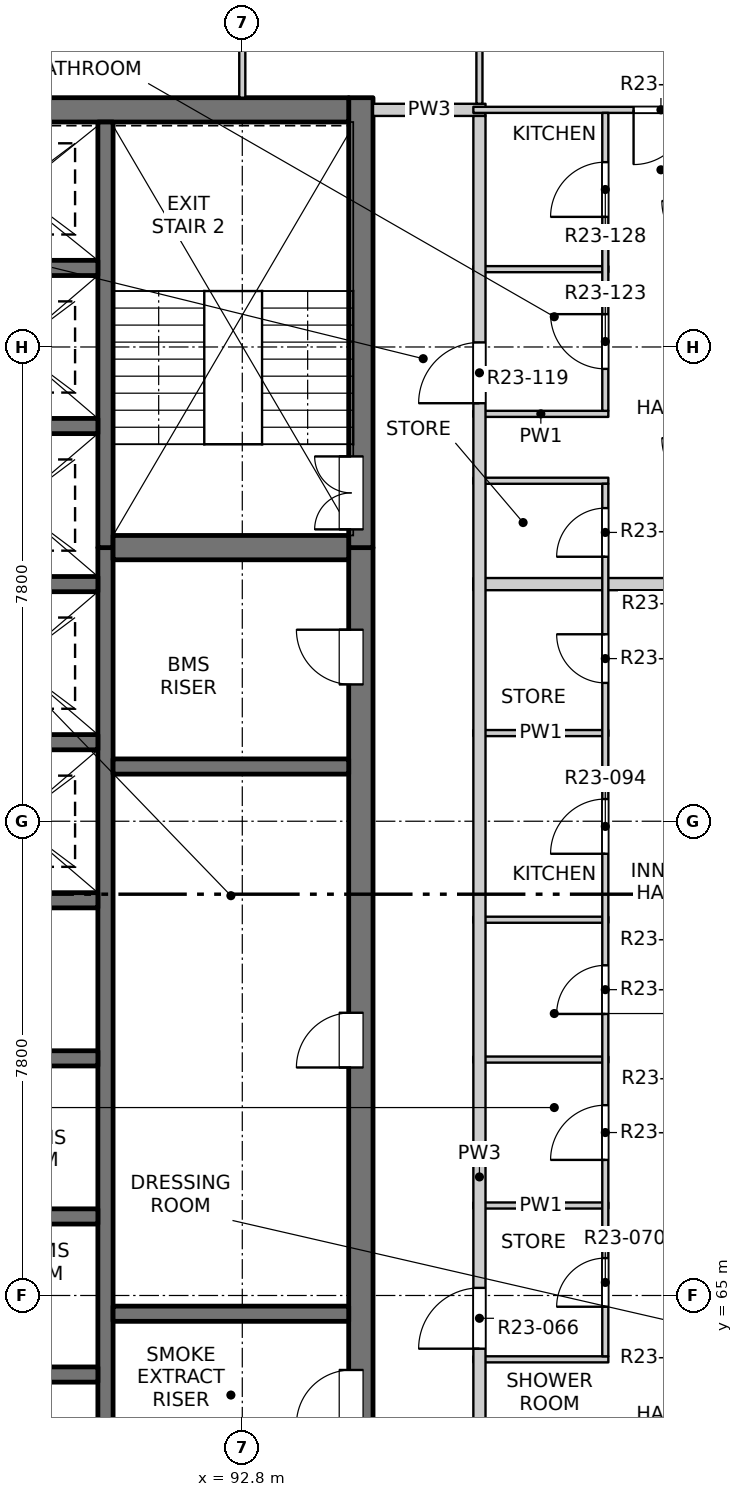
"""IFC4 building model, lengths in metres.
Left out: names, types, materials, properties, quantities, classifications, styles, units other than length and angle.
Written with IfcOpenShell. Run it as: python <this file> out.ifc"""

import sys

from ifc_helpers import new_model, si_unit, direction, frame, frame_2d, origin, place, context, subcontext, project, spatial, rectangle, extrude, element, fill, save


model = new_model("IFC4")
c1 = context("Model", 3, precision=1e-05, world=origin(), true_north=direction((0.0, 1.0)))
c2 = subcontext(c1, "Body", "Model", "MODEL_VIEW")
j1 = project(units=[si_unit("LENGTHUNIT", "METRE"), si_unit("PLANEANGLEUNIT", "RADIAN")], contexts=[c1])
p1 = place(None, origin())
s1 = spatial("IfcSite", under=j1, at=p1, CompositionType="ELEMENT")
p2 = place(p1, origin())
s2 = spatial("IfcBuilding", under=s1, at=p2, CompositionType="ELEMENT")
p3 = place(p2, frame((0.0, 0.0, 238.1)))
s3 = spatial("IfcBuildingStorey", under=s2, at=p3, CompositionType="ELEMENT", Elevation=238.1)
p4 = place(p3, frame((94.75, 61.95, -0.25), z_axis=(0.0, 0.0, 1.0), x_axis=(0.0, 1.0, 0.0)))
e1 = element("IfcWall", 1, at=p4, inside=s3, PredefinedType="SOLIDWALL", context=c2, shape_type="SweptSolid", body=[
    extrude(rectangle(XDim=15.35, YDim=0.4, at=frame_2d((7.675, 0.0))), origin(), (0.0, 0.0, 1.0), 3.35),
])
p5 = place(p4, frame((0.925, 0.0, 0.25)))
e2 = element("IfcOpeningElement", 2, at=p5, cuts=e1, PredefinedType="OPENING", context=c2, shape_type="SweptSolid", body=[
    extrude(rectangle(XDim=0.9, YDim=2.1, at=frame_2d((0.45, 1.05))), frame((0.0, 0.21, 0.0), z_axis=(0.0, -1.0, 0.0), x_axis=(1.0, 0.0, 0.0)), (0.0, 0.0, 1.0), 0.42),
])
p6 = place(p4, frame((6.8, 0.0, 0.25)))
e3 = element("IfcOpeningElement", 3, at=p6, cuts=e1, PredefinedType="OPENING", context=c2, shape_type="SweptSolid", body=[
    extrude(rectangle(XDim=0.9, YDim=2.1, at=frame_2d((0.45, 1.05))), frame((0.0, 0.21, 0.0), z_axis=(0.0, -1.0, 0.0), x_axis=(1.0, 0.0, 0.0)), (0.0, 0.0, 1.0), 0.42),
])
p7 = place(p4, frame((13.1, 0.0, 0.25)))
e4 = element("IfcOpeningElement", 4, at=p7, cuts=e1, PredefinedType="OPENING", context=c2, shape_type="SweptSolid", body=[
    extrude(rectangle(XDim=0.9, YDim=2.1, at=frame_2d((0.45, 1.05))), frame((0.0, 0.21, 0.0), z_axis=(0.0, -1.0, 0.0), x_axis=(1.0, 0.0, 0.0)), (0.0, 0.0, 1.0), 0.42),
])
p8 = place(p3, frame((94.75, 77.3, -0.25), z_axis=(0.0, 0.0, 1.0), x_axis=(0.0, 1.0, 0.0)))
e5 = element("IfcWall", 5, at=p8, inside=s3, PredefinedType="SOLIDWALL", context=c2, shape_type="SweptSolid", body=[
    extrude(rectangle(XDim=7.4, YDim=0.4, at=frame_2d((3.7, 0.0))), origin(), (0.0, 0.0, 1.0), 3.35),
])
p9 = place(p8, frame((0.3, 0.0, 0.25)))
e6 = element("IfcOpeningElement", 6, at=p9, cuts=e5, PredefinedType="OPENING", context=c2, shape_type="SweptSolid", body=[
    extrude(rectangle(XDim=1.2, YDim=2.1, at=frame_2d((0.6, 1.05))), frame((0.0, 0.21, 0.0), z_axis=(0.0, -1.0, 0.0), x_axis=(1.0, 0.0, 0.0)), (0.0, 0.0, 1.0), 0.42),
])
p10 = place(p3, frame((75.45, 84.5, -0.25), z_axis=(0.0, 0.0, 1.0), x_axis=(1.0, 0.0, 0.0)))
e7 = element("IfcWall", 7, at=p10, inside=s3, PredefinedType="SOLIDWALL", context=c2, shape_type="SweptSolid", body=[
    extrude(rectangle(XDim=19.1, YDim=0.4, at=frame_2d((9.55, 0.0))), origin(), (0.0, 0.0, 1.0), 3.35),
])
p11 = place(p3, frame((90.55, 61.95, -0.25), z_axis=(0.0, 0.0, 1.0), x_axis=(0.0, 1.0, 0.0)))
e8 = element("IfcWall", 8, at=p11, inside=s3, PredefinedType="SOLIDWALL", context=c2, shape_type="SweptSolid", body=[
    extrude(rectangle(XDim=15.35, YDim=0.25, at=frame_2d((7.675, 0.0))), origin(), (0.0, 0.0, 1.0), 3.35),
])
p12 = place(p3, frame((90.55, 77.3, -0.25), z_axis=(0.0, 0.0, 1.0), x_axis=(0.0, 1.0, 0.0)))
e9 = element("IfcWall", 9, at=p12, inside=s3, PredefinedType="SOLIDWALL", context=c2, shape_type="SweptSolid", body=[
    extrude(rectangle(XDim=7.0, YDim=0.25, at=frame_2d((3.5, 0.0))), origin(), (0.0, 0.0, 1.0), 3.35),
])
for number, where, z_axis, x_axis in (
    (10, (87.425, 63.7, -0.25), (0.0, 0.0, 1.0), (1.0, 0.0, 0.0)),
    (11, (87.425, 66.3, -0.25), (0.0, 0.0, 1.0), (1.0, 0.0, 0.0)),
    (12, (87.425, 68.9, -0.25), (0.0, 0.0, 1.0), (1.0, 0.0, 0.0)),
    (13, (87.425, 71.5, -0.25), (0.0, 0.0, 1.0), (1.0, 0.0, 0.0)),
    (14, (87.425, 74.1, -0.25), (0.0, 0.0, 1.0), (1.0, 0.0, 0.0)),
    (15, (87.425, 76.7, -0.25), (0.0, 0.0, 1.0), (1.0, 0.0, 0.0)),
    (16, (87.425, 79.3, -0.25), (0.0, 0.0, 1.0), (1.0, 0.0, 0.0)),
    (17, (87.425, 81.9, -0.25), (0.0, 0.0, 1.0), (1.0, 0.0, 0.0)),
):
    element("IfcWall", number, at=place(p3, frame(where, z_axis=z_axis, x_axis=x_axis)), inside=s3, PredefinedType="SOLIDWALL", context=c2, shape_type="SweptSolid", body=[
        extrude(rectangle(XDim=3.0, YDim=0.25, at=frame_2d((1.5, 0.0))), origin(), (0.0, 0.0, 1.0), 3.35),
    ])
for number, where, z_axis, x_axis in (
    (18, (90.675, 64.7, -0.25), (0.0, 0.0, 1.0), (1.0, 0.0, 0.0)),
    (19, (90.675, 73.7, -0.25), (0.0, 0.0, 1.0), (1.0, 0.0, 0.0)),
):
    element("IfcWall", number, at=place(p3, frame(where, z_axis=z_axis, x_axis=x_axis)), inside=s3, PredefinedType="SOLIDWALL", context=c2, shape_type="SweptSolid", body=[
        extrude(rectangle(XDim=3.875, YDim=0.25, at=frame_2d((1.938, 0.0))), origin(), (0.0, 0.0, 1.0), 3.35),
    ])
p13 = place(p3, frame((90.675, 77.3, -0.25), z_axis=(0.0, 0.0, 1.0), x_axis=(1.0, 0.0, 0.0)))
e20 = element("IfcWall", 20, at=p13, inside=s3, PredefinedType="SOLIDWALL", context=c2, shape_type="SweptSolid", body=[
    extrude(rectangle(XDim=3.875, YDim=0.4, at=frame_2d((1.938, 0.0))), origin(), (0.0, 0.0, 1.0), 3.35),
])
for number, where, z_axis, x_axis in (
    (21, (96.6, 63.95, 0.0), (0.0, 0.0, 1.0), (1.0, 0.0, 0.0)),
    (22, (96.6, 66.48, 0.0), (0.0, 0.0, 1.0), (1.0, 0.0, 0.0)),
    (23, (96.6, 68.88, 0.0), (0.0, 0.0, 1.0), (1.0, 0.0, 0.0)),
    (24, (96.6, 71.18, 0.0), (0.0, 0.0, 1.0), (1.0, 0.0, 0.0)),
    (25, (96.6, 74.25, 0.0), (0.0, 0.0, 1.0), (1.0, 0.0, 0.0)),
):
    element("IfcWall", number, at=place(p3, frame(where, z_axis=z_axis, x_axis=x_axis)), inside=s3, PredefinedType="PARTITIONING", context=c2, shape_type="SweptSolid", body=[
        extrude(rectangle(XDim=2.22, YDim=0.1, at=frame_2d((1.11, 0.0))), origin(), (0.0, 0.0, 1.0), 3.1),
    ])
p14 = place(p3, frame((96.6, 76.7, 0.0), z_axis=(0.0, 0.0, 1.0), x_axis=(1.0, 0.0, 0.0)))
e26 = element("IfcWall", 26, at=p14, inside=s3, PredefinedType="PARTITIONING", context=c2, shape_type="SweptSolid", body=[
    extrude(rectangle(XDim=11.5, YDim=0.2, at=frame_2d((5.75, 0.0))), origin(), (0.0, 0.0, 1.0), 3.1),
])
for number, where, z_axis, x_axis in (
    (27, (96.6, 78.4, 0.0), (0.0, 0.0, 1.0), (1.0, 0.0, 0.0)),
    (28, (96.6, 79.5, 0.0), (0.0, 0.0, 1.0), (1.0, 0.0, 0.0)),
    (29, (96.6, 81.88, 0.0), (0.0, 0.0, 1.0), (1.0, 0.0, 0.0)),
):
    element("IfcWall", number, at=place(p3, frame(where, z_axis=z_axis, x_axis=x_axis)), inside=s3, PredefinedType="PARTITIONING", context=c2, shape_type="SweptSolid", body=[
        extrude(rectangle(XDim=2.22, YDim=0.1, at=frame_2d((1.11, 0.0))), origin(), (0.0, 0.0, 1.0), 3.1),
    ])
p15 = place(p3, frame((94.95, 84.5, 0.0), z_axis=(0.0, 0.0, 1.0), x_axis=(1.0, 0.0, 0.0)))
e30 = element("IfcWall", 30, at=p15, inside=s3, PredefinedType="PARTITIONING", context=c2, shape_type="SweptSolid", body=[
    extrude(rectangle(XDim=1.85, YDim=0.2, at=frame_2d((0.925, 0.0))), origin(), (0.0, 0.0, 1.0), 3.1),
])
p16 = place(p3, frame((96.6, 84.5, 0.0), z_axis=(0.0, 0.0, 1.0), x_axis=(1.0, 0.0, 0.0)))
e31 = element("IfcWall", 31, at=p16, inside=s3, PredefinedType="PARTITIONING", context=c2, shape_type="SweptSolid", body=[
    extrude(rectangle(XDim=11.5, YDim=0.1, at=frame_2d((5.75, 0.0))), origin(), (0.0, 0.0, 1.0), 3.1),
])
p17 = place(p16, frame((2.635, 0.0, 0.0)))
e32 = element("IfcOpeningElement", 32, at=p17, cuts=e31, PredefinedType="OPENING", context=c2, shape_type="SweptSolid", body=[
    extrude(rectangle(XDim=0.9, YDim=2.1, at=frame_2d((0.45, 1.05))), frame((0.0, 0.06, 0.0), z_axis=(0.0, -1.0, 0.0), x_axis=(1.0, 0.0, 0.0)), (0.0, 0.0, 1.0), 0.12),
])
p18 = place(p3, frame((92.8, 84.7, 0.0), z_axis=(0.0, 0.0, 1.0), x_axis=(0.0, 1.0, 0.0)))
e33 = element("IfcWall", 33, at=p18, inside=s3, PredefinedType="PARTITIONING", context=c2, shape_type="SweptSolid", body=[
    extrude(rectangle(XDim=3.4, YDim=0.1, at=frame_2d((1.7, 0.0))), origin(), (0.0, 0.0, 1.0), 3.1),
])
p19 = place(p18, frame((1.3, 0.0, 0.0)))
e34 = element("IfcOpeningElement", 34, at=p19, cuts=e33, PredefinedType="OPENING", context=c2, shape_type="SweptSolid", body=[
    extrude(rectangle(XDim=0.9, YDim=2.1, at=frame_2d((0.45, 1.05))), frame((0.0, 0.06, 0.0), z_axis=(0.0, -1.0, 0.0), x_axis=(1.0, 0.0, 0.0)), (0.0, 0.0, 1.0), 0.12),
])
p20 = place(p3, frame((96.7, 49.5, 0.0), z_axis=(0.0, 0.0, 1.0), x_axis=(0.0, 1.0, 0.0)))
e35 = element("IfcWall", 35, at=p20, inside=s3, PredefinedType="PARTITIONING", context=c2, shape_type="SweptSolid", body=[
    extrude(rectangle(XDim=34.9, YDim=0.2, at=frame_2d((17.45, 0.0))), origin(), (0.0, 0.0, 1.0), 3.1),
])
p21 = place(p20, frame((3.175, 0.0, 0.0)))
e36 = element("IfcOpeningElement", 36, at=p21, cuts=e35, PredefinedType="OPENING", context=c2, shape_type="SweptSolid", body=[
    extrude(rectangle(XDim=1.0, YDim=2.1, at=frame_2d((0.5, 1.05))), frame((0.0, 0.11, 0.0), z_axis=(0.0, -1.0, 0.0), x_axis=(1.0, 0.0, 0.0)), (0.0, 0.0, 1.0), 0.22),
])
p22 = place(p20, frame((14.625, 0.0, 0.0)))
e37 = element("IfcOpeningElement", 37, at=p22, cuts=e35, PredefinedType="OPENING", context=c2, shape_type="SweptSolid", body=[
    extrude(rectangle(XDim=1.0, YDim=2.1, at=frame_2d((0.5, 1.05))), frame((0.0, 0.11, 0.0), z_axis=(0.0, -1.0, 0.0), x_axis=(1.0, 0.0, 0.0)), (0.0, 0.0, 1.0), 0.22),
])
p23 = place(p20, frame((30.175, 0.0, 0.0)))
e38 = element("IfcOpeningElement", 38, at=p23, cuts=e35, PredefinedType="OPENING", context=c2, shape_type="SweptSolid", body=[
    extrude(rectangle(XDim=1.0, YDim=2.1, at=frame_2d((0.5, 1.05))), frame((0.0, 0.11, 0.0), z_axis=(0.0, -1.0, 0.0), x_axis=(1.0, 0.0, 0.0)), (0.0, 0.0, 1.0), 0.22),
])
p24 = place(p3, frame((96.7, 84.6, 0.0), z_axis=(0.0, 0.0, 1.0), x_axis=(0.0, 1.0, 0.0)))
e39 = element("IfcWall", 39, at=p24, inside=s3, PredefinedType="PARTITIONING", context=c2, shape_type="SweptSolid", body=[
    extrude(rectangle(XDim=3.5, YDim=0.1, at=frame_2d((1.75, 0.0))), origin(), (0.0, 0.0, 1.0), 3.1),
])
p25 = place(p24, frame((1.4, 0.0, 0.0)))
e40 = element("IfcOpeningElement", 40, at=p25, cuts=e39, PredefinedType="OPENING", context=c2, shape_type="SweptSolid", body=[
    extrude(rectangle(XDim=0.9, YDim=2.1, at=frame_2d((0.45, 1.05))), frame((0.0, 0.06, 0.0), z_axis=(0.0, -1.0, 0.0), x_axis=(1.0, 0.0, 0.0)), (0.0, 0.0, 1.0), 0.12),
])
p26 = place(p3, frame((98.77, 64.0, 0.0), z_axis=(0.0, 0.0, 1.0), x_axis=(0.0, 1.0, 0.0)))
e41 = element("IfcWall", 41, at=p26, inside=s3, PredefinedType="PARTITIONING", context=c2, shape_type="SweptSolid", body=[
    extrude(rectangle(XDim=14.35, YDim=0.1, at=frame_2d((7.175, 0.0))), origin(), (0.0, 0.0, 1.0), 3.1),
])
p27 = place(p26, frame((0.815, 0.0, 0.0)))
e42 = element("IfcOpeningElement", 42, at=p27, cuts=e41, PredefinedType="OPENING", context=c2, shape_type="SweptSolid", body=[
    extrude(rectangle(XDim=0.8, YDim=2.1, at=frame_2d((0.4, 1.05))), frame((0.0, 0.06, 0.0), z_axis=(0.0, -1.0, 0.0), x_axis=(1.0, 0.0, 0.0)), (0.0, 0.0, 1.0), 0.12),
])
p28 = place(p26, frame((3.23, 0.0, 0.0)))
e43 = element("IfcOpeningElement", 43, at=p28, cuts=e41, PredefinedType="OPENING", context=c2, shape_type="SweptSolid", body=[
    extrude(rectangle(XDim=0.9, YDim=2.1, at=frame_2d((0.45, 1.05))), frame((0.0, 0.06, 0.0), z_axis=(0.0, -1.0, 0.0), x_axis=(1.0, 0.0, 0.0)), (0.0, 0.0, 1.0), 0.12),
])
p29 = place(p26, frame((5.63, 0.0, 0.0)))
e44 = element("IfcOpeningElement", 44, at=p29, cuts=e41, PredefinedType="OPENING", context=c2, shape_type="SweptSolid", body=[
    extrude(rectangle(XDim=0.8, YDim=2.1, at=frame_2d((0.4, 1.05))), frame((0.0, 0.06, 0.0), z_axis=(0.0, -1.0, 0.0), x_axis=(1.0, 0.0, 0.0)), (0.0, 0.0, 1.0), 0.12),
])
p30 = place(p26, frame((8.265, 0.0, 0.0)))
e45 = element("IfcOpeningElement", 45, at=p30, cuts=e41, PredefinedType="OPENING", context=c2, shape_type="SweptSolid", body=[
    extrude(rectangle(XDim=0.9, YDim=2.1, at=frame_2d((0.45, 1.05))), frame((0.0, 0.06, 0.0), z_axis=(0.0, -1.0, 0.0), x_axis=(1.0, 0.0, 0.0)), (0.0, 0.0, 1.0), 0.12),
])
p31 = place(p26, frame((11.075, 0.0, 0.0)))
e46 = element("IfcOpeningElement", 46, at=p31, cuts=e41, PredefinedType="OPENING", context=c2, shape_type="SweptSolid", body=[
    extrude(rectangle(XDim=0.8, YDim=2.1, at=frame_2d((0.4, 1.05))), frame((0.0, 0.06, 0.0), z_axis=(0.0, -1.0, 0.0), x_axis=(1.0, 0.0, 0.0)), (0.0, 0.0, 1.0), 0.12),
])
p32 = place(p26, frame((13.15, 0.0, 0.0)))
e47 = element("IfcOpeningElement", 47, at=p32, cuts=e41, PredefinedType="OPENING", context=c2, shape_type="SweptSolid", body=[
    extrude(rectangle(XDim=0.8, YDim=2.1, at=frame_2d((0.4, 1.05))), frame((0.0, 0.06, 0.0), z_axis=(0.0, -1.0, 0.0), x_axis=(1.0, 0.0, 0.0)), (0.0, 0.0, 1.0), 0.12),
])
p33 = place(p3, frame((98.77, 79.55, 0.0), z_axis=(0.0, 0.0, 1.0), x_axis=(0.0, 1.0, 0.0)))
e48 = element("IfcWall", 48, at=p33, inside=s3, PredefinedType="PARTITIONING", context=c2, shape_type="SweptSolid", body=[
    extrude(rectangle(XDim=4.9, YDim=0.1, at=frame_2d((2.45, 0.0))), origin(), (0.0, 0.0, 1.0), 3.1),
])
p34 = place(p33, frame((0.69, 0.0, 0.0)))
e49 = element("IfcOpeningElement", 49, at=p34, cuts=e48, PredefinedType="OPENING", context=c2, shape_type="SweptSolid", body=[
    extrude(rectangle(XDim=0.9, YDim=2.1, at=frame_2d((0.45, 1.05))), frame((0.0, 0.06, 0.0), z_axis=(0.0, -1.0, 0.0), x_axis=(1.0, 0.0, 0.0)), (0.0, 0.0, 1.0), 0.12),
])
p35 = place(p33, frame((3.19, 0.0, 0.0)))
e50 = element("IfcOpeningElement", 50, at=p35, cuts=e48, PredefinedType="OPENING", context=c2, shape_type="SweptSolid", body=[
    extrude(rectangle(XDim=0.9, YDim=2.1, at=frame_2d((0.45, 1.05))), frame((0.0, 0.06, 0.0), z_axis=(0.0, -1.0, 0.0), x_axis=(1.0, 0.0, 0.0)), (0.0, 0.0, 1.0), 0.12),
])
p36 = place(p5, origin())
e51 = element("IfcDoor", 51, at=p36, inside=s3, OperationType="SINGLE_SWING_LEFT", PredefinedType="DOOR", context=c2, shape_type="SweptSolid", body=[
    extrude(rectangle(XDim=0.9, YDim=2.1, at=frame_2d((0.45, 1.05))), frame((0.0, 0.185, 0.0), z_axis=(0.0, -1.0, 0.0), x_axis=(1.0, 0.0, 0.0)), (0.0, 0.0, 1.0), 0.05),
])
fill(e2, e51)
p37 = place(p22, origin())
e52 = element("IfcDoor", 52, at=p37, inside=s3, OperationType="SINGLE_SWING_LEFT", PredefinedType="DOOR", context=c2, shape_type="SweptSolid", body=[
    extrude(rectangle(XDim=1.0, YDim=2.1, at=frame_2d((0.5, 1.05))), frame((0.0, 0.025, 0.0), z_axis=(0.0, -1.0, 0.0), x_axis=(1.0, 0.0, 0.0)), (0.0, 0.0, 1.0), 0.05),
])
fill(e37, e52)
p38 = place(p27, origin())
e53 = element("IfcDoor", 53, at=p38, inside=s3, OperationType="SINGLE_SWING_LEFT", PredefinedType="DOOR", context=c2, shape_type="SweptSolid", body=[
    extrude(rectangle(XDim=0.8, YDim=2.1, at=frame_2d((0.4, 1.05))), frame((0.0, 0.025, 0.0), z_axis=(0.0, -1.0, 0.0), x_axis=(1.0, 0.0, 0.0)), (0.0, 0.0, 1.0), 0.05),
])
fill(e42, e53)
p39 = place(p28, origin())
e54 = element("IfcDoor", 54, at=p39, inside=s3, OperationType="SINGLE_SWING_LEFT", PredefinedType="DOOR", context=c2, shape_type="SweptSolid", body=[
    extrude(rectangle(XDim=0.9, YDim=2.1, at=frame_2d((0.45, 1.05))), frame((0.0, 0.025, 0.0), z_axis=(0.0, -1.0, 0.0), x_axis=(1.0, 0.0, 0.0)), (0.0, 0.0, 1.0), 0.05),
])
fill(e43, e54)
p40 = place(p6, origin())
e55 = element("IfcDoor", 55, at=p40, inside=s3, OperationType="SINGLE_SWING_LEFT", PredefinedType="DOOR", context=c2, shape_type="SweptSolid", body=[
    extrude(rectangle(XDim=0.9, YDim=2.1, at=frame_2d((0.45, 1.05))), frame((0.0, 0.185, 0.0), z_axis=(0.0, -1.0, 0.0), x_axis=(1.0, 0.0, 0.0)), (0.0, 0.0, 1.0), 0.05),
])
fill(e3, e55)
p41 = place(p29, origin())
e56 = element("IfcDoor", 56, at=p41, inside=s3, OperationType="SINGLE_SWING_LEFT", PredefinedType="DOOR", context=c2, shape_type="SweptSolid", body=[
    extrude(rectangle(XDim=0.8, YDim=2.1, at=frame_2d((0.4, 1.05))), frame((0.0, 0.025, 0.0), z_axis=(0.0, -1.0, 0.0), x_axis=(1.0, 0.0, 0.0)), (0.0, 0.0, 1.0), 0.05),
])
fill(e44, e56)
p42 = place(p30, origin())
e57 = element("IfcDoor", 57, at=p42, inside=s3, OperationType="SINGLE_SWING_LEFT", PredefinedType="DOOR", context=c2, shape_type="SweptSolid", body=[
    extrude(rectangle(XDim=0.9, YDim=2.1, at=frame_2d((0.45, 1.05))), frame((0.0, 0.025, 0.0), z_axis=(0.0, -1.0, 0.0), x_axis=(1.0, 0.0, 0.0)), (0.0, 0.0, 1.0), 0.05),
])
fill(e45, e57)
p43 = place(p31, origin())
e58 = element("IfcDoor", 58, at=p43, inside=s3, OperationType="SINGLE_SWING_RIGHT", PredefinedType="DOOR", context=c2, shape_type="SweptSolid", body=[
    extrude(rectangle(XDim=0.8, YDim=2.1, at=frame_2d((0.4, 1.05))), frame((0.0, 0.025, 0.0), z_axis=(0.0, -1.0, 0.0), x_axis=(1.0, 0.0, 0.0)), (0.0, 0.0, 1.0), 0.05),
])
fill(e46, e58)
p44 = place(p7, origin())
e59 = element("IfcDoor", 59, at=p44, inside=s3, OperationType="SINGLE_SWING_RIGHT", PredefinedType="DOOR", context=c2, shape_type="SweptSolid", body=[
    extrude(rectangle(XDim=0.9, YDim=2.1, at=frame_2d((0.45, 1.05))), frame((0.0, 0.185, 0.0), z_axis=(0.0, -1.0, 0.0), x_axis=(1.0, 0.0, 0.0)), (0.0, 0.0, 1.0), 0.05),
])
fill(e4, e59)
p45 = place(p32, origin())
e60 = element("IfcDoor", 60, at=p45, inside=s3, OperationType="SINGLE_SWING_LEFT", PredefinedType="DOOR", context=c2, shape_type="SweptSolid", body=[
    extrude(rectangle(XDim=0.8, YDim=2.1, at=frame_2d((0.4, 1.05))), frame((0.0, 0.025, 0.0), z_axis=(0.0, -1.0, 0.0), x_axis=(1.0, 0.0, 0.0)), (0.0, 0.0, 1.0), 0.05),
])
fill(e47, e60)
p46 = place(p9, origin())
e61 = element("IfcDoor", 61, at=p46, inside=s3, OperationType="DOUBLE_DOOR_SINGLE_SWING", PredefinedType="DOOR", context=c2, shape_type="SweptSolid", body=[
    extrude(rectangle(XDim=1.2, YDim=2.1, at=frame_2d((0.6, 1.05))), frame((0.0, 0.185, 0.0), z_axis=(0.0, -1.0, 0.0), x_axis=(1.0, 0.0, 0.0)), (0.0, 0.0, 1.0), 0.05),
])
fill(e6, e61)
p47 = place(p23, origin())
e62 = element("IfcDoor", 62, at=p47, inside=s3, OperationType="SINGLE_SWING_LEFT", PredefinedType="DOOR", context=c2, shape_type="SweptSolid", body=[
    extrude(rectangle(XDim=1.0, YDim=2.1, at=frame_2d((0.5, 1.05))), frame((0.0, 0.025, 0.0), z_axis=(0.0, -1.0, 0.0), x_axis=(1.0, 0.0, 0.0)), (0.0, 0.0, 1.0), 0.05),
])
fill(e38, e62)
p48 = place(p34, origin())
e63 = element("IfcDoor", 63, at=p48, inside=s3, OperationType="SINGLE_SWING_RIGHT", PredefinedType="DOOR", context=c2, shape_type="SweptSolid", body=[
    extrude(rectangle(XDim=0.9, YDim=2.1, at=frame_2d((0.45, 1.05))), frame((0.0, 0.025, 0.0), z_axis=(0.0, -1.0, 0.0), x_axis=(1.0, 0.0, 0.0)), (0.0, 0.0, 1.0), 0.05),
])
fill(e49, e63)
p49 = place(p35, origin())
e64 = element("IfcDoor", 64, at=p49, inside=s3, OperationType="SINGLE_SWING_LEFT", PredefinedType="DOOR", context=c2, shape_type="SweptSolid", body=[
    extrude(rectangle(XDim=0.9, YDim=2.1, at=frame_2d((0.45, 1.05))), frame((0.0, 0.025, 0.0), z_axis=(0.0, -1.0, 0.0), x_axis=(1.0, 0.0, 0.0)), (0.0, 0.0, 1.0), 0.05),
])
fill(e50, e64)
p50 = place(p17, origin())
e65 = element("IfcDoor", 65, at=p50, inside=s3, OperationType="SINGLE_SWING_RIGHT", PredefinedType="DOOR", context=c2, shape_type="SweptSolid", body=[
    extrude(rectangle(XDim=0.9, YDim=2.1, at=frame_2d((0.45, 1.05))), frame((0.0, 0.025, 0.0), z_axis=(0.0, -1.0, 0.0), x_axis=(1.0, 0.0, 0.0)), (0.0, 0.0, 1.0), 0.05),
])
fill(e32, e65)
save(model, sys.argv[1])
